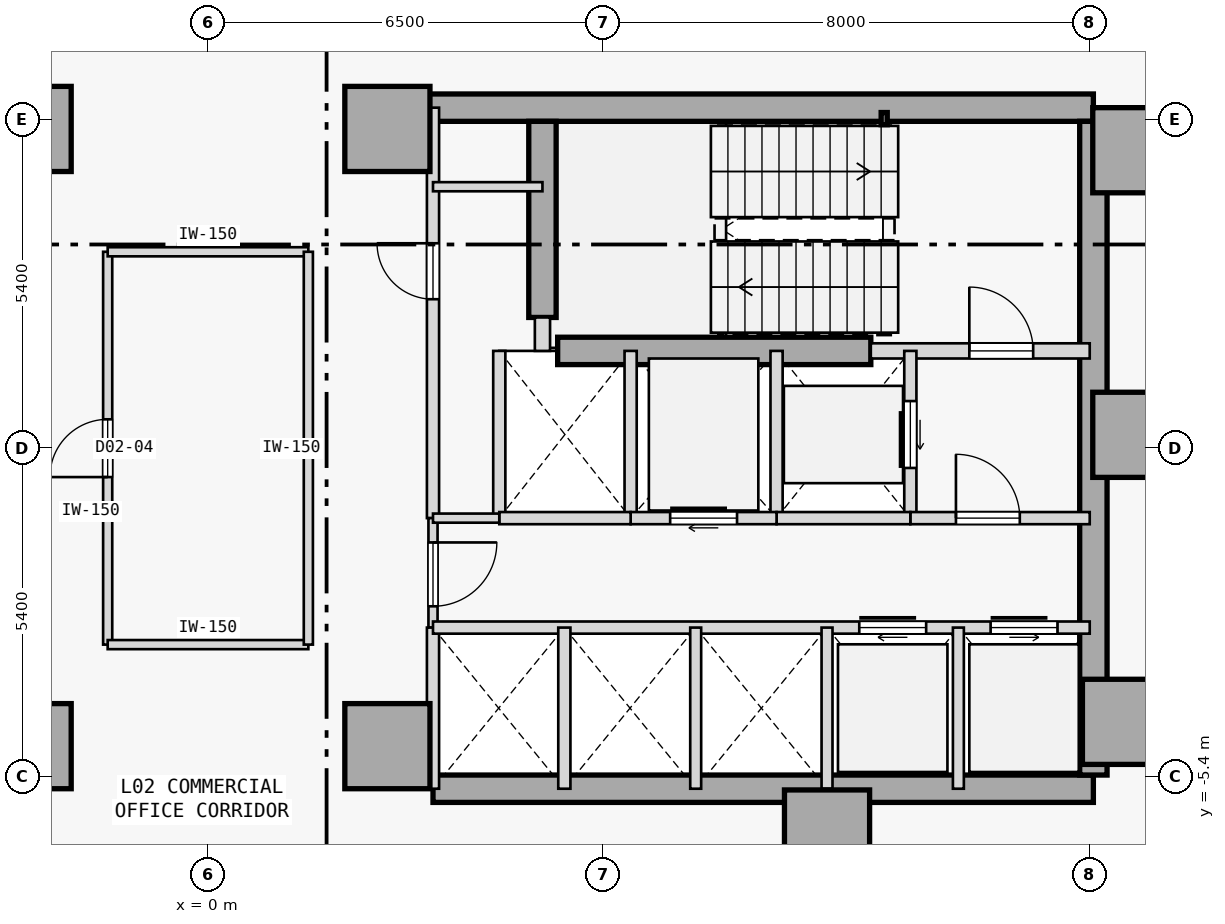
"""IFC4 building model, lengths in metres.
Left out: names, types, materials, properties, quantities, classifications, styles, units other than length and angle.
Written with IfcOpenShell. Run it as: python <this file> out.ifc"""

import sys

from ifc_helpers import new_model, si_unit, direction, frame, frame_2d, origin, origin_2d, place, context, subcontext, project, spatial, rectangle, hollow_rectangle, extrude, element, fill, save


model = new_model("IFC4")
c1 = context("Model", 3, precision=1e-05, world=origin(), true_north=direction((0.0, 1.0)))
c2 = subcontext(c1, "Body", "Model", "MODEL_VIEW")
j1 = project(units=[si_unit("LENGTHUNIT", "METRE"), si_unit("PLANEANGLEUNIT", "RADIAN")], contexts=[c1])
p1 = place(None, origin())
s1 = spatial("IfcSite", under=j1, at=p1, CompositionType="ELEMENT")
p2 = place(p1, origin())
s2 = spatial("IfcBuilding", under=s1, at=p2, CompositionType="ELEMENT")
p3 = place(p2, frame((0.0, 0.0, 14.2)))
s3 = spatial("IfcBuildingStorey", under=s2, at=p3, CompositionType="ELEMENT", Elevation=14.2)
for number, where, z_axis, x_axis in (
    (1, (-2.95, -4.9, 0.0), (0.0, 0.0, 1.0), (1.0, 0.0, 0.0)),
    (2, (-2.95, 5.25, 0.0), (0.0, 0.0, 1.0), (1.0, 0.0, 0.0)),
    (3, (15.25, 4.9, 0.0), (0.0, 0.0, 1.0), (1.0, 0.0, 0.0)),
    (4, (15.25, 0.22, 0.0), (0.0, 0.0, 1.0), (1.0, 0.0, 0.0)),
    (5, (15.08, -4.5, 0.0), (0.0, 0.0, 1.0), (1.0, 0.0, 0.0)),
    (6, (10.18, -6.32, 0.0), (0.0, 0.0, 1.0), (1.0, 0.0, 0.0)),
    (7, (2.95, -4.9, 0.0), (0.0, 0.0, 1.0), (1.0, 0.0, 0.0)),
    (8, (2.95, 5.25, 0.0), (0.0, 0.0, 1.0), (1.0, 0.0, 0.0)),
):
    element("IfcColumn", number, at=place(p3, frame(where, z_axis=z_axis, x_axis=x_axis)), inside=s3, PredefinedType="COLUMN", context=c2, shape_type="SweptSolid", body=[
        extrude(rectangle(XDim=1.4, YDim=1.4, at=origin_2d()), origin(), (0.0, 0.0, 1.0), 3.8),
    ])
p4 = place(p3, frame((3.15, 5.6, 0.0), z_axis=(0.0, 0.0, 1.0), x_axis=(1.0, 0.0, 0.0)))
e9 = element("IfcWall", 9, at=p4, inside=s3, PredefinedType="SHEAR", context=c2, shape_type="SweptSolid", body=[
    extrude(rectangle(XDim=11.41, YDim=0.45, at=frame_2d((5.705, 0.0))), origin(), (0.0, 0.0, 1.0), 3.575),
])
p5 = place(p3, frame((3.7, -5.6, 0.0), z_axis=(0.0, 0.0, 1.0), x_axis=(1.0, 0.0, 0.0)))
e10 = element("IfcWall", 10, at=p5, inside=s3, PredefinedType="SHEAR", context=c2, shape_type="SweptSolid", body=[
    extrude(rectangle(XDim=10.86, YDim=0.45, at=frame_2d((5.43, 0.0))), origin(), (0.0, 0.0, 1.0), 3.575),
])
p6 = place(p3, frame((14.56, -5.375, 0.0), z_axis=(0.0, 0.0, 1.0), x_axis=(0.0, 1.0, 0.0)))
e11 = element("IfcWall", 11, at=p6, inside=s3, PredefinedType="SHEAR", context=c2, shape_type="SweptSolid", body=[
    extrude(rectangle(XDim=10.75, YDim=0.45, at=frame_2d((5.375, 0.0))), origin(), (0.0, 0.0, 1.0), 3.575),
])
p7 = place(p3, frame((5.5, 2.15, 0.0), z_axis=(0.0, 0.0, 1.0), x_axis=(0.0, 1.0, 0.0)))
e12 = element("IfcWall", 12, at=p7, inside=s3, PredefinedType="SHEAR", context=c2, shape_type="SweptSolid", body=[
    extrude(rectangle(XDim=3.225, YDim=0.45, at=frame_2d((1.613, 0.0))), origin(), (0.0, 0.0, 1.0), 3.575),
])
p8 = place(p3, frame((5.75, 1.6, 0.0), z_axis=(0.0, 0.0, 1.0), x_axis=(1.0, 0.0, 0.0)))
e13 = element("IfcWall", 13, at=p8, inside=s3, PredefinedType="SHEAR", context=c2, shape_type="SweptSolid", body=[
    extrude(rectangle(XDim=5.15, YDim=0.45, at=frame_2d((2.575, 0.0))), origin(), (0.0, 0.0, 1.0), 3.575),
])
p9 = place(p3, frame((11.12, 5.42, 0.0), z_axis=(0.0, 0.0, 1.0), x_axis=(1.0, 0.0, 0.0)))
e14 = element("IfcColumn", 14, at=p9, inside=s3, PredefinedType="COLUMN", context=c2, shape_type="SweptSolid", body=[
    extrude(hollow_rectangle(XDim=0.1, YDim=0.2, WallThickness=0.008, at=origin_2d()), origin(), (0.0, 0.0, 1.0), 3.8),
])
p10 = place(p3, frame((10.9, 1.6, 0.0), z_axis=(0.0, 0.0, 1.0), x_axis=(1.0, 0.0, 0.0)))
e15 = element("IfcWall", 15, at=p10, inside=s3, PredefinedType="STANDARD", context=c2, shape_type="SweptSolid", body=[
    extrude(rectangle(XDim=3.6, YDim=0.25, at=frame_2d((1.8, 0.0))), origin(), (0.0, 0.0, 1.0), 3.575),
])
p11 = place(p10, frame((1.62, 0.0, 0.0)))
e16 = element("IfcOpeningElement", 16, at=p11, cuts=e15, PredefinedType="OPENING", context=c2, shape_type="SweptSolid", body=[
    extrude(rectangle(XDim=1.05, YDim=2.15, at=frame_2d((0.525, 1.075))), frame((0.0, 0.135, 0.0), z_axis=(0.0, -1.0, 0.0), x_axis=(1.0, 0.0, 0.0)), (0.0, 0.0, 1.0), 0.27),
])
p12 = place(p3, frame((5.5, 1.6, 0.0), z_axis=(0.0, 0.0, 1.0), x_axis=(0.0, 1.0, 0.0)))
e17 = element("IfcWall", 17, at=p12, inside=s3, PredefinedType="STANDARD", context=c2, shape_type="SweptSolid", body=[
    extrude(rectangle(XDim=0.55, YDim=0.25, at=frame_2d((0.275, 0.0))), origin(), (0.0, 0.0, 1.0), 3.575),
])
p13 = place(p3, frame((3.7, -1.15, 0.0), z_axis=(0.0, 0.0, 1.0), x_axis=(0.0, 1.0, 0.0)))
e18 = element("IfcWall", 18, at=p13, inside=s3, PredefinedType="STANDARD", context=c2, shape_type="SweptSolid", body=[
    extrude(rectangle(XDim=6.75, YDim=0.2, at=frame_2d((3.375, 0.0))), origin(), (0.0, 0.0, 1.0), 3.575),
])
p14 = place(p13, frame((3.6, 0.0, 0.0)))
e19 = element("IfcOpeningElement", 19, at=p14, cuts=e18, PredefinedType="OPENING", context=c2, shape_type="SweptSolid", body=[
    extrude(rectangle(XDim=0.92, YDim=2.15, at=frame_2d((0.46, 1.075))), frame((0.0, 0.11, 0.0), z_axis=(0.0, -1.0, 0.0), x_axis=(1.0, 0.0, 0.0)), (0.0, 0.0, 1.0), 0.22),
])
p15 = place(p3, frame((3.7, -2.95, 0.0), z_axis=(0.0, 0.0, 1.0), x_axis=(0.0, 1.0, 0.0)))
e20 = element("IfcWall", 20, at=p15, inside=s3, PredefinedType="PARTITIONING", context=c2, shape_type="SweptSolid", body=[
    extrude(rectangle(XDim=1.8, YDim=0.15, at=frame_2d((0.9, 0.0))), origin(), (0.0, 0.0, 1.0), 3.575),
])
p16 = place(p15, frame((0.35, 0.0, 0.0)))
e21 = element("IfcOpeningElement", 21, at=p16, cuts=e20, PredefinedType="OPENING", context=c2, shape_type="SweptSolid", body=[
    extrude(rectangle(XDim=1.05, YDim=2.18, at=frame_2d((0.525, 1.09))), frame((0.0, 0.085, 0.0), z_axis=(0.0, -1.0, 0.0), x_axis=(1.0, 0.0, 0.0)), (0.0, 0.0, 1.0), 0.17),
])
p17 = place(p3, frame((3.7, -5.6, 0.0), z_axis=(0.0, 0.0, 1.0), x_axis=(0.0, 1.0, 0.0)))
e22 = element("IfcWall", 22, at=p17, inside=s3, PredefinedType="STANDARD", context=c2, shape_type="SweptSolid", body=[
    extrude(rectangle(XDim=2.65, YDim=0.2, at=frame_2d((1.325, 0.0))), origin(), (0.0, 0.0, 1.0), 3.575),
])
p18 = place(p3, frame((11.55, -1.15, 0.0), z_axis=(0.0, 0.0, 1.0), x_axis=(0.0, 1.0, 0.0)))
e23 = element("IfcWall", 23, at=p18, inside=s3, PredefinedType="STANDARD", context=c2, shape_type="SweptSolid", body=[
    extrude(rectangle(XDim=2.75, YDim=0.2, at=frame_2d((1.375, 0.0))), origin(), (0.0, 0.0, 1.0), 3.575),
])
p19 = place(p18, frame((0.825, 0.0, 0.0)))
e24 = element("IfcOpeningElement", 24, at=p19, cuts=e23, PredefinedType="OPENING", context=c2, shape_type="SweptSolid", body=[
    extrude(rectangle(XDim=1.1, YDim=2.15, at=frame_2d((0.55, 1.075))), frame((0.0, 0.11, 0.0), z_axis=(0.0, -1.0, 0.0), x_axis=(1.0, 0.0, 0.0)), (0.0, 0.0, 1.0), 0.22),
])
p20 = place(p3, frame((9.35, -1.15, 0.0), z_axis=(0.0, 0.0, 1.0), x_axis=(0.0, 1.0, 0.0)))
e25 = element("IfcWall", 25, at=p20, inside=s3, PredefinedType="STANDARD", context=c2, shape_type="SweptSolid", body=[
    extrude(rectangle(XDim=2.75, YDim=0.2, at=frame_2d((1.375, 0.0))), origin(), (0.0, 0.0, 1.0), 3.575),
])
p21 = place(p3, frame((11.55, -1.15, 0.0), z_axis=(0.0, 0.0, 1.0), x_axis=(1.0, 0.0, 0.0)))
e26 = element("IfcWall", 26, at=p21, inside=s3, PredefinedType="STANDARD", context=c2, shape_type="SweptSolid", body=[
    extrude(rectangle(XDim=2.95, YDim=0.2, at=frame_2d((1.475, 0.0))), origin(), (0.0, 0.0, 1.0), 3.575),
])
p22 = place(p21, frame((0.75, 0.0, 0.0)))
e27 = element("IfcOpeningElement", 27, at=p22, cuts=e26, PredefinedType="OPENING", context=c2, shape_type="SweptSolid", body=[
    extrude(rectangle(XDim=1.05, YDim=2.18, at=frame_2d((0.525, 1.09))), frame((0.0, 0.11, 0.0), z_axis=(0.0, -1.0, 0.0), x_axis=(1.0, 0.0, 0.0)), (0.0, 0.0, 1.0), 0.22),
])
p23 = place(p3, frame((9.35, -1.15, 0.0), z_axis=(0.0, 0.0, 1.0), x_axis=(1.0, 0.0, 0.0)))
e28 = element("IfcWall", 28, at=p23, inside=s3, PredefinedType="STANDARD", context=c2, shape_type="SweptSolid", body=[
    extrude(rectangle(XDim=2.2, YDim=0.2, at=frame_2d((1.1, 0.0))), origin(), (0.0, 0.0, 1.0), 3.575),
])
p24 = place(p3, frame((6.95, -1.15, 0.0), z_axis=(0.0, 0.0, 1.0), x_axis=(0.0, 1.0, 0.0)))
e29 = element("IfcWall", 29, at=p24, inside=s3, PredefinedType="STANDARD", context=c2, shape_type="SweptSolid", body=[
    extrude(rectangle(XDim=2.75, YDim=0.2, at=frame_2d((1.375, 0.0))), origin(), (0.0, 0.0, 1.0), 3.575),
])
p25 = place(p3, frame((6.95, -1.15, 0.0), z_axis=(0.0, 0.0, 1.0), x_axis=(1.0, 0.0, 0.0)))
e30 = element("IfcWall", 30, at=p25, inside=s3, PredefinedType="STANDARD", context=c2, shape_type="SweptSolid", body=[
    extrude(rectangle(XDim=2.4, YDim=0.2, at=frame_2d((1.2, 0.0))), origin(), (0.0, 0.0, 1.0), 3.575),
])
p26 = place(p25, frame((0.65, 0.0, 0.0)))
e31 = element("IfcOpeningElement", 31, at=p26, cuts=e30, PredefinedType="OPENING", context=c2, shape_type="SweptSolid", body=[
    extrude(rectangle(XDim=1.1, YDim=2.15, at=frame_2d((0.55, 1.075))), frame((0.0, 0.11, 0.0), z_axis=(0.0, -1.0, 0.0), x_axis=(1.0, 0.0, 0.0)), (0.0, 0.0, 1.0), 0.22),
])
p27 = place(p3, frame((4.79, -1.15, 0.0), z_axis=(0.0, 0.0, 1.0), x_axis=(0.0, 1.0, 0.0)))
e32 = element("IfcWall", 32, at=p27, inside=s3, PredefinedType="STANDARD", context=c2, shape_type="SweptSolid", body=[
    extrude(rectangle(XDim=2.75, YDim=0.2, at=frame_2d((1.375, 0.0))), origin(), (0.0, 0.0, 1.0), 3.575),
])
p28 = place(p3, frame((4.79, -1.15, 0.0), z_axis=(0.0, 0.0, 1.0), x_axis=(1.0, 0.0, 0.0)))
e33 = element("IfcWall", 33, at=p28, inside=s3, PredefinedType="STANDARD", context=c2, shape_type="SweptSolid", body=[
    extrude(rectangle(XDim=2.16, YDim=0.2, at=frame_2d((1.08, 0.0))), origin(), (0.0, 0.0, 1.0), 3.575),
])
p29 = place(p3, frame((3.7, -1.15, 0.0), z_axis=(0.0, 0.0, 1.0), x_axis=(1.0, 0.0, 0.0)))
e34 = element("IfcWall", 34, at=p29, inside=s3, PredefinedType="PARTITIONING", context=c2, shape_type="SweptSolid", body=[
    extrude(rectangle(XDim=1.09, YDim=0.15, at=frame_2d((0.545, 0.0))), origin(), (0.0, 0.0, 1.0), 3.575),
])
p30 = place(p3, frame((3.7, -2.95, 0.0), z_axis=(0.0, 0.0, 1.0), x_axis=(1.0, 0.0, 0.0)))
e35 = element("IfcWall", 35, at=p30, inside=s3, PredefinedType="STANDARD", context=c2, shape_type="SweptSolid", body=[
    extrude(rectangle(XDim=10.8, YDim=0.2, at=frame_2d((5.4, 0.0))), origin(), (0.0, 0.0, 1.0), 3.575),
])
p31 = place(p30, frame((7.01, 0.0, 0.0)))
e36 = element("IfcOpeningElement", 36, at=p31, cuts=e35, PredefinedType="OPENING", context=c2, shape_type="SweptSolid", body=[
    extrude(rectangle(XDim=1.1, YDim=2.15, at=frame_2d((0.55, 1.075))), frame((0.0, 0.11, 0.0), z_axis=(0.0, -1.0, 0.0), x_axis=(1.0, 0.0, 0.0)), (0.0, 0.0, 1.0), 0.22),
])
p32 = place(p30, frame((9.17, 0.0, 0.0)))
e37 = element("IfcOpeningElement", 37, at=p32, cuts=e35, PredefinedType="OPENING", context=c2, shape_type="SweptSolid", body=[
    extrude(rectangle(XDim=1.1, YDim=2.15, at=frame_2d((0.55, 1.075))), frame((0.0, 0.11, 0.0), z_axis=(0.0, -1.0, 0.0), x_axis=(1.0, 0.0, 0.0)), (0.0, 0.0, 1.0), 0.22),
])
p33 = place(p3, frame((5.86, -5.6, 0.0), z_axis=(0.0, 0.0, 1.0), x_axis=(0.0, 1.0, 0.0)))
e38 = element("IfcWall", 38, at=p33, inside=s3, PredefinedType="STANDARD", context=c2, shape_type="SweptSolid", body=[
    extrude(rectangle(XDim=2.65, YDim=0.2, at=frame_2d((1.325, 0.0))), origin(), (0.0, 0.0, 1.0), 3.575),
])
for number, where, z_axis, x_axis in (
    (39, (12.34, -5.6, 0.0), (0.0, 0.0, 1.0), (0.0, 1.0, 0.0)),
    (40, (10.18, -5.6, 0.0), (0.0, 0.0, 1.0), (0.0, 1.0, 0.0)),
    (41, (8.02, -5.6, 0.0), (0.0, 0.0, 1.0), (0.0, 1.0, 0.0)),
):
    element("IfcWall", number, at=place(p3, frame(where, z_axis=z_axis, x_axis=x_axis)), inside=s3, PredefinedType="STANDARD", context=c2, shape_type="SweptSolid", body=[
        extrude(rectangle(XDim=2.65, YDim=0.18, at=frame_2d((1.325, 0.0))), origin(), (0.0, 0.0, 1.0), 3.575),
    ])
p34 = place(p3, frame((3.7, 4.3, 0.0), z_axis=(0.0, 0.0, 1.0), x_axis=(1.0, 0.0, 0.0)))
e42 = element("IfcWall", 42, at=p34, inside=s3, PredefinedType="PARTITIONING", context=c2, shape_type="SweptSolid", body=[
    extrude(rectangle(XDim=1.8, YDim=0.15, at=frame_2d((0.9, 0.0))), origin(), (0.0, 0.0, 1.0), 3.575),
])
p35 = place(p3, frame((-1.65, -3.23, 0.0), z_axis=(0.0, 0.0, 1.0), x_axis=(0.0, 1.0, 0.0)))
e43 = element("IfcWall", 43, at=p35, inside=s3, PredefinedType="PARTITIONING", context=c2, shape_type="SweptSolid", body=[
    extrude(rectangle(XDim=6.46, YDim=0.15, at=frame_2d((3.23, 0.0))), origin(), (0.0, 0.0, 1.0), 3.575),
])
p36 = place(p35, frame((2.755, 0.0, 0.0)))
e44 = element("IfcOpeningElement", 44, at=p36, cuts=e43, PredefinedType="OPENING", context=c2, shape_type="SweptSolid", body=[
    extrude(rectangle(XDim=0.95, YDim=2.15, at=frame_2d((0.475, 1.075))), frame((0.0, 0.085, 0.0), z_axis=(0.0, -1.0, 0.0), x_axis=(1.0, 0.0, 0.0)), (0.0, 0.0, 1.0), 0.17),
])
for number, where, z_axis, x_axis in (
    (45, (-1.65, -3.23, 0.0), (0.0, 0.0, 1.0), (1.0, 0.0, 0.0)),
    (46, (-1.65, 3.23, 0.0), (0.0, 0.0, 1.0), (1.0, 0.0, 0.0)),
):
    element("IfcWall", number, at=place(p3, frame(where, z_axis=z_axis, x_axis=x_axis)), inside=s3, PredefinedType="PARTITIONING", context=c2, shape_type="SweptSolid", body=[
        extrude(rectangle(XDim=3.3, YDim=0.15, at=frame_2d((1.65, 0.0))), origin(), (0.0, 0.0, 1.0), 3.575),
    ])
p37 = place(p3, frame((1.65, -3.23, 0.0), z_axis=(0.0, 0.0, 1.0), x_axis=(0.0, 1.0, 0.0)))
e47 = element("IfcWall", 47, at=p37, inside=s3, PredefinedType="PARTITIONING", context=c2, shape_type="SweptSolid", body=[
    extrude(rectangle(XDim=6.46, YDim=0.15, at=frame_2d((3.23, 0.0))), origin(), (0.0, 0.0, 1.0), 3.575),
])
p38 = place(p11, origin())
e48 = element("IfcDoor", 48, at=p38, inside=s3, OperationType="SINGLE_SWING_LEFT", PredefinedType="DOOR", context=c2, shape_type="SweptSolid", body=[
    extrude(rectangle(XDim=1.05, YDim=2.15, at=frame_2d((0.525, 1.075))), frame((0.0, 0.025, 0.0), z_axis=(0.0, -1.0, 0.0), x_axis=(1.0, 0.0, 0.0)), (0.0, 0.0, 1.0), 0.05),
])
fill(e16, e48)
p39 = place(p22, origin())
e49 = element("IfcDoor", 49, at=p39, inside=s3, OperationType="SINGLE_SWING_LEFT", PredefinedType="DOOR", context=c2, shape_type="SweptSolid", body=[
    extrude(rectangle(XDim=1.05, YDim=2.18, at=frame_2d((0.525, 1.09))), frame((0.0, 0.025, 0.0), z_axis=(0.0, -1.0, 0.0), x_axis=(1.0, 0.0, 0.0)), (0.0, 0.0, 1.0), 0.05),
])
fill(e27, e49)
p40 = place(p16, frame((1.05, 0.0, 0.0), z_axis=(0.0, 0.0, 1.0), x_axis=(-1.0, 0.0, 0.0)))
e50 = element("IfcDoor", 50, at=p40, inside=s3, OperationType="SINGLE_SWING_RIGHT", PredefinedType="DOOR", context=c2, shape_type="SweptSolid", body=[
    extrude(rectangle(XDim=1.05, YDim=2.18, at=frame_2d((0.525, 1.09))), frame((0.0, 0.025, 0.0), z_axis=(0.0, -1.0, 0.0), x_axis=(1.0, 0.0, 0.0)), (0.0, 0.0, 1.0), 0.05),
])
fill(e21, e50)
p41 = place(p19, origin())
e51 = element("IfcDoor", 51, at=p41, inside=s3, OperationType="SLIDING_TO_RIGHT", PredefinedType="DOOR", context=c2, shape_type="SweptSolid", body=[
    extrude(rectangle(XDim=1.1, YDim=2.15, at=frame_2d((0.55, 1.075))), frame((0.0, 0.025, 0.0), z_axis=(0.0, -1.0, 0.0), x_axis=(1.0, 0.0, 0.0)), (0.0, 0.0, 1.0), 0.05),
])
fill(e24, e51)
p42 = place(p26, origin())
e52 = element("IfcDoor", 52, at=p42, inside=s3, OperationType="SLIDING_TO_RIGHT", PredefinedType="DOOR", context=c2, shape_type="SweptSolid", body=[
    extrude(rectangle(XDim=1.1, YDim=2.15, at=frame_2d((0.55, 1.075))), frame((0.0, 0.025, 0.0), z_axis=(0.0, -1.0, 0.0), x_axis=(1.0, 0.0, 0.0)), (0.0, 0.0, 1.0), 0.05),
])
fill(e31, e52)
p43 = place(p31, origin())
e53 = element("IfcDoor", 53, at=p43, inside=s3, OperationType="SLIDING_TO_RIGHT", PredefinedType="DOOR", context=c2, shape_type="SweptSolid", body=[
    extrude(rectangle(XDim=1.1, YDim=2.15, at=frame_2d((0.55, 1.075))), frame((0.0, 0.025, 0.0), z_axis=(0.0, -1.0, 0.0), x_axis=(1.0, 0.0, 0.0)), (0.0, 0.0, 1.0), 0.05),
])
fill(e36, e53)
p44 = place(p32, origin())
e54 = element("IfcDoor", 54, at=p44, inside=s3, OperationType="SLIDING_TO_LEFT", PredefinedType="DOOR", context=c2, shape_type="SweptSolid", body=[
    extrude(rectangle(XDim=1.1, YDim=2.15, at=frame_2d((0.55, 1.075))), frame((0.0, 0.025, 0.0), z_axis=(0.0, -1.0, 0.0), x_axis=(1.0, 0.0, 0.0)), (0.0, 0.0, 1.0), 0.05),
])
fill(e37, e54)
p45 = place(p14, origin())
e55 = element("IfcDoor", 55, at=p45, inside=s3, OperationType="SINGLE_SWING_RIGHT", PredefinedType="DOOR", context=c2, shape_type="SweptSolid", body=[
    extrude(rectangle(XDim=0.92, YDim=2.15, at=frame_2d((0.46, 1.075))), frame((0.0, 0.025, 0.0), z_axis=(0.0, -1.0, 0.0), x_axis=(1.0, 0.0, 0.0)), (0.0, 0.0, 1.0), 0.05),
])
fill(e19, e55)
p46 = place(p36, origin())
e56 = element("IfcDoor", 56, at=p46, inside=s3, OperationType="SINGLE_SWING_LEFT", PredefinedType="DOOR", context=c2, shape_type="SweptSolid", body=[
    extrude(rectangle(XDim=0.95, YDim=2.15, at=frame_2d((0.475, 1.075))), frame((0.0, 0.025, 0.0), z_axis=(0.0, -1.0, 0.0), x_axis=(1.0, 0.0, 0.0)), (0.0, 0.0, 1.0), 0.05),
])
fill(e44, e56)
save(model, sys.argv[1])
